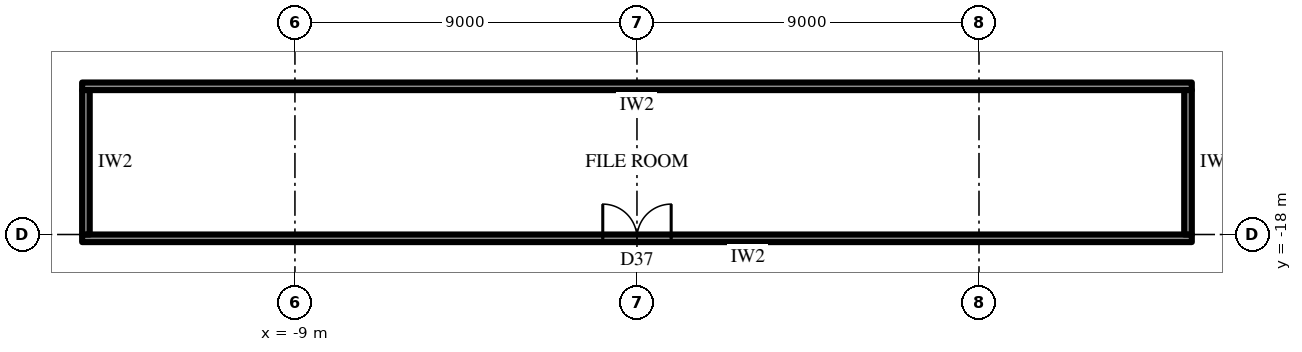
"""IFC4 building model, lengths in metres.
Left out: names, types, materials, properties, quantities, classifications, styles, units other than length and angle.
Written with IfcOpenShell. Run it as: python <this file> out.ifc"""

import sys

from ifc_helpers import new_model, si_unit, direction, frame, frame_2d, origin, place, context, subcontext, project, spatial, rectangle, extrude, element, fill, save


model = new_model("IFC4")
c1 = context("Model", 3, precision=1e-05, world=origin(), true_north=direction((0.0, 1.0)))
c2 = subcontext(c1, "Body", "Model", "MODEL_VIEW")
j1 = project(units=[si_unit("LENGTHUNIT", "METRE"), si_unit("PLANEANGLEUNIT", "RADIAN")], contexts=[c1])
p1 = place(None, origin())
s1 = spatial("IfcSite", under=j1, at=p1, CompositionType="ELEMENT")
p2 = place(p1, origin())
s2 = spatial("IfcBuilding", under=s1, at=p2, CompositionType="ELEMENT")
p3 = place(p2, frame((0.0, 0.0, 236.5)))
s3 = spatial("IfcBuildingStorey", under=s2, at=p3, CompositionType="ELEMENT", Elevation=236.5)
p4 = place(p3, frame((14.6, -14.1, 0.0), z_axis=(0.0, 0.0, 1.0), x_axis=(-1.0, 0.0, 0.0)))
e1 = element("IfcWall", 1, at=p4, inside=s3, PredefinedType="PARTITIONING", context=c2, shape_type="SweptSolid", body=[
    extrude(rectangle(XDim=29.2, YDim=0.2, at=frame_2d((14.6, 0.0))), origin(), (0.0, 0.0, 1.0), 4.0),
])
p5 = place(p3, frame((14.6, -18.1, 0.0), z_axis=(0.0, 0.0, 1.0), x_axis=(-1.0, 0.0, 0.0)))
e2 = element("IfcWall", 2, at=p5, inside=s3, PredefinedType="PARTITIONING", context=c2, shape_type="SweptSolid", body=[
    extrude(rectangle(XDim=29.2, YDim=0.2, at=frame_2d((14.6, 0.0))), origin(), (0.0, 0.0, 1.0), 4.0),
])
p6 = place(p5, frame((13.7, 0.0, 0.0)))
e3 = element("IfcOpeningElement", 3, at=p6, cuts=e2, PredefinedType="OPENING", context=c2, shape_type="SweptSolid", body=[
    extrude(rectangle(XDim=1.8, YDim=2.4, at=frame_2d((0.9, 1.2))), frame((0.0, 0.11, 0.0), z_axis=(0.0, -1.0, 0.0), x_axis=(1.0, 0.0, 0.0)), (0.0, 0.0, 1.0), 0.22),
])
for number, where, z_axis, x_axis in (
    (4, (14.5, -14.2, 0.0), (0.0, 0.0, 1.0), (0.0, -1.0, 0.0)),
    (5, (-14.5, -14.2, 0.0), (0.0, 0.0, 1.0), (0.0, -1.0, 0.0)),
):
    element("IfcWall", number, at=place(p3, frame(where, z_axis=z_axis, x_axis=x_axis)), inside=s3, PredefinedType="PARTITIONING", context=c2, shape_type="SweptSolid", body=[
        extrude(rectangle(XDim=3.8, YDim=0.2, at=frame_2d((1.9, 0.0))), origin(), (0.0, 0.0, 1.0), 4.0),
    ])
p7 = place(p6, frame((1.8, 0.0, 0.0), z_axis=(0.0, 0.0, 1.0), x_axis=(-1.0, 0.0, 0.0)))
e6 = element("IfcDoor", 6, at=p7, inside=s3, OperationType="DOUBLE_DOOR_SINGLE_SWING", PredefinedType="DOOR", context=c2, shape_type="SweptSolid", body=[
    extrude(rectangle(XDim=1.8, YDim=2.4, at=frame_2d((0.9, 1.2))), frame((0.0, 0.025, 0.0), z_axis=(0.0, -1.0, 0.0), x_axis=(1.0, 0.0, 0.0)), (0.0, 0.0, 1.0), 0.05),
])
fill(e3, e6)
save(model, sys.argv[1])
